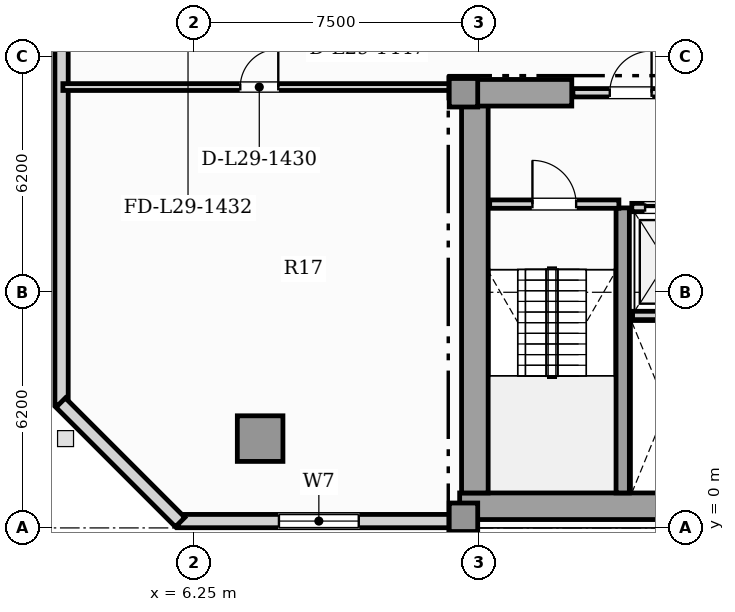
"""IFC4 building model, lengths in metres.
Left out: names, types, materials, properties, quantities, classifications, styles, units other than length and angle.
Written with IfcOpenShell. Run it as: python <this file> out.ifc"""

import sys

from ifc_helpers import new_model, si_unit, direction, frame, frame_2d, origin, origin_2d, place, context, subcontext, project, spatial, rectangle, hollow_rectangle, extrude, element, fill, save


model = new_model("IFC4")
c1 = context("Model", 3, precision=1e-05, world=origin(), true_north=direction((0.0, 1.0)))
c2 = subcontext(c1, "Body", "Model", "MODEL_VIEW")
j1 = project(units=[si_unit("LENGTHUNIT", "METRE"), si_unit("PLANEANGLEUNIT", "RADIAN")], contexts=[c1])
p1 = place(None, origin())
s1 = spatial("IfcSite", under=j1, at=p1, CompositionType="ELEMENT")
p2 = place(p1, origin())
s2 = spatial("IfcBuilding", under=s1, at=p2, CompositionType="ELEMENT")
p3 = place(p2, frame((0.0, 0.0, 119.55)))
s3 = spatial("IfcBuildingStorey", under=s2, at=p3, CompositionType="ELEMENT", Elevation=119.55)
p4 = place(p3, frame((13.25, 0.57, 0.0), z_axis=(0.0, 0.0, 1.0), x_axis=(1.0, 0.0, 0.0)))
e1 = element("IfcWall", 1, at=p4, inside=s3, PredefinedType="SHEAR", context=c2, shape_type="SweptSolid", body=[
    extrude(rectangle(XDim=31.0, YDim=0.7, at=frame_2d((15.5, 0.0))), origin(), (0.0, 0.0, 1.0), 3.6),
])
p5 = place(p3, frame((13.65, 0.92, 0.0), z_axis=(0.0, 0.0, 1.0), x_axis=(0.0, 1.0, 0.0)))
e2 = element("IfcWall", 2, at=p5, inside=s3, PredefinedType="SHEAR", context=c2, shape_type="SweptSolid", body=[
    extrude(rectangle(XDim=10.53, YDim=0.7, at=frame_2d((5.265, 0.0))), origin(), (0.0, 0.0, 1.0), 3.6),
])
p6 = place(p3, frame((13.25, 11.45, 0.0), z_axis=(0.0, 0.0, 1.0), x_axis=(1.0, 0.0, 0.0)))
e3 = element("IfcWall", 3, at=p6, inside=s3, PredefinedType="SHEAR", context=c2, shape_type="SweptSolid", body=[
    extrude(rectangle(XDim=2.95, YDim=0.7, at=frame_2d((1.475, 0.0))), origin(), (0.0, 0.0, 1.0), 3.6),
])
p7 = place(p3, frame((17.54, 0.92, 0.0), z_axis=(0.0, 0.0, 1.0), x_axis=(0.0, 1.0, 0.0)))
e4 = element("IfcWall", 4, at=p7, inside=s3, PredefinedType="SHEAR", context=c2, shape_type="SweptSolid", body=[
    extrude(rectangle(XDim=7.5, YDim=0.35, at=frame_2d((3.75, 0.0))), origin(), (0.0, 0.0, 1.0), 3.6),
])
for number, where, z_axis, x_axis in (
    (5, (13.35, 0.28, 0.0), (0.0, 0.0, 1.0), (1.0, 0.0, 0.0)),
    (6, (13.35, 11.45, 0.0), (0.0, 0.0, 1.0), (1.0, 0.0, 0.0)),
):
    element("IfcColumn", number, at=place(p3, frame(where, z_axis=z_axis, x_axis=x_axis)), inside=s3, PredefinedType="COLUMN", context=c2, shape_type="SweptSolid", body=[
        extrude(rectangle(XDim=0.75, YDim=0.75, at=origin_2d()), origin(), (0.0, 0.0, 1.0), 3.85),
    ])
p8 = place(p3, frame((8.0, 2.35, 0.0), z_axis=(0.0, 0.0, 1.0), x_axis=(1.0, 0.0, 0.0)))
e7 = element("IfcColumn", 7, at=p8, inside=s3, PredefinedType="USERDEFINED", context=c2, shape_type="SweptSolid", body=[
    extrude(hollow_rectangle(XDim=1.2, YDim=1.2, WallThickness=0.07, at=origin_2d()), origin(), (0.0, 0.0, 1.0), 3.85),
])
p9 = place(p3, frame((5.84, 0.18, 0.0), z_axis=(0.0, 0.0, 1.0), x_axis=(1.0, 0.0, 0.0)))
e8 = element("IfcWall", 8, at=p9, inside=s3, PredefinedType="SOLIDWALL", context=c2, shape_type="SweptSolid", body=[
    extrude(rectangle(XDim=7.41, YDim=0.35, at=frame_2d((3.705, 0.0))), origin(), (0.0, 0.0, 1.0), 3.6),
])
p10 = place(p9, frame((2.655, 0.0, 0.85)))
e9 = element("IfcOpeningElement", 9, at=p10, cuts=e8, PredefinedType="OPENING", context=c2, shape_type="SweptSolid", body=[
    extrude(rectangle(XDim=2.1, YDim=2.05, at=frame_2d((1.05, 1.025))), frame((0.0, 0.185, 0.0), z_axis=(0.0, -1.0, 0.0), x_axis=(1.0, 0.0, 0.0)), (0.0, 0.0, 1.0), 0.37),
])
p11 = place(p3, frame((2.775, 21.61, 0.0), z_axis=(0.0, 0.0, 1.0), x_axis=(0.0, -1.0, 0.0)))
e10 = element("IfcWall", 10, at=p11, inside=s3, PredefinedType="SOLIDWALL", context=c2, shape_type="SweptSolid", body=[
    extrude(rectangle(XDim=18.37, YDim=0.35, at=frame_2d((9.185, 0.0))), origin(), (0.0, 0.0, 1.0), 3.6),
])
p12 = place(p3, frame((2.752, 3.295, 0.0), z_axis=(0.0, 0.0, 1.0), x_axis=(0.707134240044, -0.707079321262, 0.0)))
e11 = element("IfcWall", 11, at=p12, inside=s3, PredefinedType="SOLIDWALL", context=c2, shape_type="SweptSolid", body=[
    extrude(rectangle(XDim=4.446, YDim=0.35, at=frame_2d((2.223, 0.0))), origin(), (0.0, 0.0, 1.0), 3.6),
])
p13 = place(p3, frame((17.8, 5.59, 0.0), z_axis=(0.0, 0.0, 1.0), x_axis=(1.0, 0.0, 0.0)))
e12 = element("IfcWall", 12, at=p13, inside=s3, PredefinedType="SOLIDWALL", context=c2, shape_type="SweptSolid", body=[
    extrude(rectangle(XDim=1.78, YDim=0.22, at=frame_2d((0.89, 0.0))), origin(), (0.0, 0.0, 1.0), 3.6),
])
p14 = place(p3, frame((17.78, 8.43, 0.0), z_axis=(0.0, 0.0, 1.0), x_axis=(1.0, 0.0, 0.0)))
e13 = element("IfcWall", 13, at=p14, inside=s3, PredefinedType="SOLIDWALL", context=c2, shape_type="SweptSolid", body=[
    extrude(rectangle(XDim=1.82, YDim=0.22, at=frame_2d((0.91, 0.0))), origin(), (0.0, 0.0, 1.0), 3.6),
])
p15 = place(p14, frame((0.35, 0.0, 0.0)))
e14 = element("IfcOpeningElement", 14, at=p15, cuts=e13, PredefinedType="OPENING", context=c2, shape_type="SweptSolid", body=[
    extrude(rectangle(XDim=1.12, YDim=2.25, at=frame_2d((0.56, 1.125))), frame((0.0, 0.12, 0.0), z_axis=(0.0, -1.0, 0.0), x_axis=(1.0, 0.0, 0.0)), (0.0, 0.0, 1.0), 0.24),
])
p16 = place(p3, frame((14.04, 8.52, 0.0), z_axis=(0.0, 0.0, 1.0), x_axis=(1.0, 0.0, 0.0)))
e15 = element("IfcWall", 15, at=p16, inside=s3, PredefinedType="SOLIDWALL", context=c2, shape_type="SweptSolid", body=[
    extrude(rectangle(XDim=3.4, YDim=0.22, at=frame_2d((1.7, 0.0))), origin(), (0.0, 0.0, 1.0), 3.6),
])
p17 = place(p16, frame((1.125, 0.0, 0.0)))
e16 = element("IfcOpeningElement", 16, at=p17, cuts=e15, PredefinedType="OPENING", context=c2, shape_type="SweptSolid", body=[
    extrude(rectangle(XDim=1.15, YDim=2.2, at=frame_2d((0.575, 1.1))), frame((0.0, 0.12, 0.0), z_axis=(0.0, -1.0, 0.0), x_axis=(1.0, 0.0, 0.0)), (0.0, 0.0, 1.0), 0.24),
])
p18 = place(p3, frame((16.23, 11.45, 0.0), z_axis=(0.0, 0.0, 1.0), x_axis=(1.0, 0.0, 0.0)))
e17 = element("IfcWall", 17, at=p18, inside=s3, PredefinedType="SOLIDWALL", context=c2, shape_type="SweptSolid", body=[
    extrude(rectangle(XDim=3.04, YDim=0.22, at=frame_2d((1.52, 0.0))), origin(), (0.0, 0.0, 1.0), 3.6),
])
p19 = place(p18, frame((0.97, 0.0, 0.0)))
e18 = element("IfcOpeningElement", 18, at=p19, cuts=e17, PredefinedType="OPENING", context=c2, shape_type="SweptSolid", body=[
    extrude(rectangle(XDim=1.1, YDim=2.2, at=frame_2d((0.55, 1.1))), frame((0.0, 0.12, 0.0), z_axis=(0.0, -1.0, 0.0), x_axis=(1.0, 0.0, 0.0)), (0.0, 0.0, 1.0), 0.24),
])
p20 = place(p3, frame((2.81, 11.6, 0.0), z_axis=(0.0, 0.0, 1.0), x_axis=(1.0, 0.0, 0.0)))
e19 = element("IfcWall", 19, at=p20, inside=s3, PredefinedType="PARTITIONING", context=c2, shape_type="SweptSolid", body=[
    extrude(rectangle(XDim=10.335, YDim=0.18, at=frame_2d((5.167, 0.0))), origin(), (0.0, 0.0, 1.0), 3.6),
])
p21 = place(p20, frame((4.667, 0.0, 0.0)))
e20 = element("IfcOpeningElement", 20, at=p21, cuts=e19, PredefinedType="OPENING", context=c2, shape_type="SweptSolid", body=[
    extrude(rectangle(XDim=1.0, YDim=2.15, at=frame_2d((0.5, 1.075))), frame((0.0, 0.1, 0.0), z_axis=(0.0, -1.0, 0.0), x_axis=(1.0, 0.0, 0.0)), (0.0, 0.0, 1.0), 0.2),
])
p22 = place(p10, origin())
e21 = element("IfcWindow", 21, at=p22, inside=s3, PartitioningType="SINGLE_PANEL", PredefinedType="WINDOW", context=c2, shape_type="SweptSolid", body=[
    extrude(rectangle(XDim=2.1, YDim=2.05, at=frame_2d((1.05, 1.025))), frame((0.0, 0.03, 0.0), z_axis=(0.0, -1.0, 0.0), x_axis=(1.0, 0.0, 0.0)), (0.0, 0.0, 1.0), 0.06),
])
fill(e9, e21)
p23 = place(p15, origin())
e22 = element("IfcDoor", 22, at=p23, inside=s3, OperationType="SLIDING_TO_LEFT", PredefinedType="DOOR", context=c2, shape_type="SweptSolid", body=[
    extrude(rectangle(XDim=1.12, YDim=2.25, at=frame_2d((0.56, 1.125))), frame((0.0, 0.025, 0.0), z_axis=(0.0, -1.0, 0.0), x_axis=(1.0, 0.0, 0.0)), (0.0, 0.0, 1.0), 0.05),
])
fill(e14, e22)
p24 = place(p17, origin())
e23 = element("IfcDoor", 23, at=p24, inside=s3, OperationType="SINGLE_SWING_LEFT", PredefinedType="DOOR", context=c2, shape_type="SweptSolid", body=[
    extrude(rectangle(XDim=1.15, YDim=2.2, at=frame_2d((0.575, 1.1))), frame((0.0, 0.025, 0.0), z_axis=(0.0, -1.0, 0.0), x_axis=(1.0, 0.0, 0.0)), (0.0, 0.0, 1.0), 0.05),
])
fill(e16, e23)
p25 = place(p19, origin())
e24 = element("IfcDoor", 24, at=p25, inside=s3, OperationType="SINGLE_SWING_RIGHT", PredefinedType="DOOR", context=c2, shape_type="SweptSolid", body=[
    extrude(rectangle(XDim=1.1, YDim=2.2, at=frame_2d((0.55, 1.1))), frame((0.0, 0.025, 0.0), z_axis=(0.0, -1.0, 0.0), x_axis=(1.0, 0.0, 0.0)), (0.0, 0.0, 1.0), 0.05),
])
fill(e18, e24)
p26 = place(p21, origin())
e25 = element("IfcDoor", 25, at=p26, inside=s3, OperationType="SINGLE_SWING_RIGHT", PredefinedType="DOOR", context=c2, shape_type="SweptSolid", body=[
    extrude(rectangle(XDim=1.0, YDim=2.15, at=frame_2d((0.5, 1.075))), frame((0.0, 0.025, 0.0), z_axis=(0.0, -1.0, 0.0), x_axis=(1.0, 0.0, 0.0)), (0.0, 0.0, 1.0), 0.05),
])
fill(e20, e25)
save(model, sys.argv[1])
